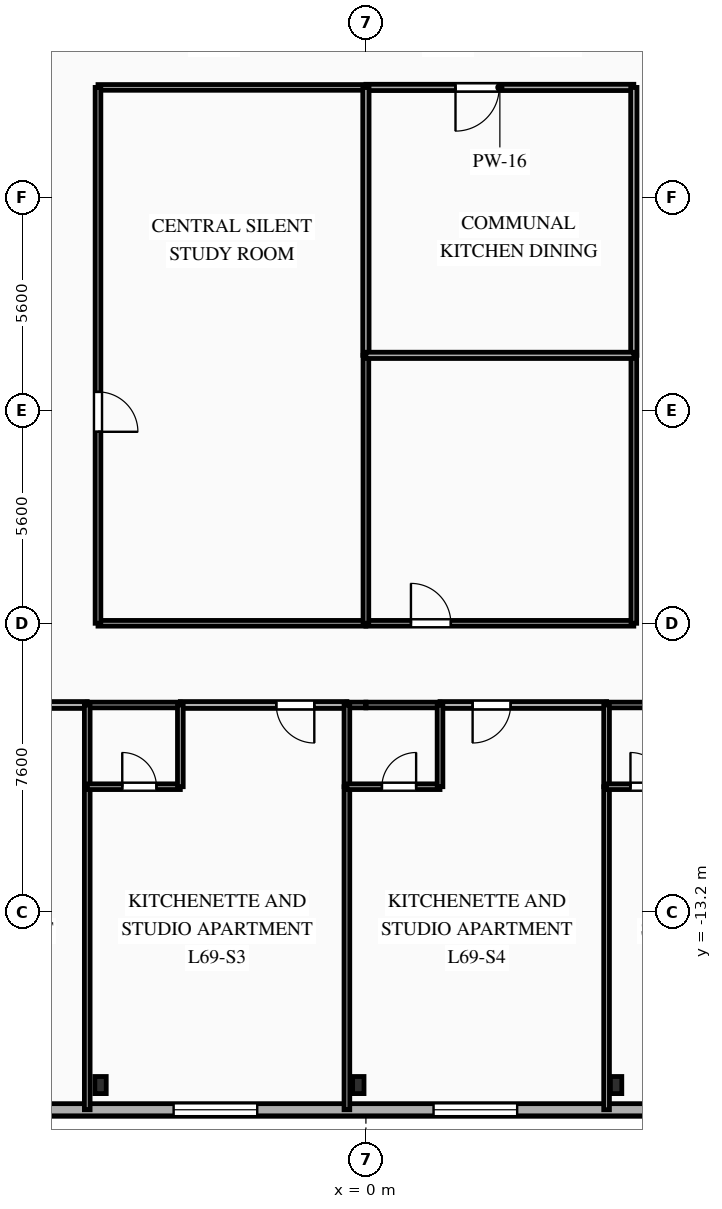
"""IFC4 building model, lengths in metres.
Left out: names, types, materials, properties, quantities, classifications, styles, units other than length and angle.
Written with IfcOpenShell. Run it as: python <this file> out.ifc"""

import sys

from ifc_helpers import new_model, si_unit, direction, frame, frame_2d, origin, origin_2d, place, context, subcontext, project, spatial, rectangle, i_section, extrude, element, fill, save


model = new_model("IFC4")
c1 = context("Model", 3, precision=1e-05, world=origin(), true_north=direction((0.0, 1.0)))
c2 = subcontext(c1, "Body", "Model", "MODEL_VIEW")
j1 = project(units=[si_unit("LENGTHUNIT", "METRE"), si_unit("PLANEANGLEUNIT", "RADIAN")], contexts=[c1])
p1 = place(None, origin())
s1 = spatial("IfcSite", under=j1, at=p1, CompositionType="ELEMENT")
p2 = place(p1, origin())
s2 = spatial("IfcBuilding", under=s1, at=p2, CompositionType="ELEMENT")
p3 = place(p2, frame((0.0, 0.0, 245.05)))
s3 = spatial("IfcBuildingStorey", under=s2, at=p3, CompositionType="ELEMENT", Elevation=245.05)
for number, where, z_axis, x_axis in (
    (1, (-6.983, -17.75, 0.0), (0.0, 0.0, 1.0), (1.0, 0.0, 0.0)),
    (2, (-0.2, -17.75, 0.0), (0.0, 0.0, 1.0), (1.0, 0.0, 0.0)),
    (3, (6.583, -17.75, 0.0), (0.0, 0.0, 1.0), (1.0, 0.0, 0.0)),
):
    element("IfcColumn", number, at=place(p3, frame(where, z_axis=z_axis, x_axis=x_axis)), inside=s3, PredefinedType="COLUMN", context=c2, shape_type="SweptSolid", body=[
        extrude(i_section(OverallWidth=0.3, OverallDepth=0.45, WebThickness=0.014, FlangeThickness=0.026, FilletRadius=0.027, at=origin_2d()), origin(), (0.0, 0.0, 1.0), 3.35),
    ])
p4 = place(p3, frame((20.8, -18.4, 0.0), z_axis=(0.0, 0.0, 1.0), x_axis=(-1.0, 0.0, 0.0)))
e4 = element("IfcWall", 4, at=p4, inside=s3, PredefinedType="SOLIDWALL", context=c2, shape_type="SweptSolid", body=[
    extrude(rectangle(XDim=42.0, YDim=0.32, at=frame_2d((21.0, 0.0))), origin(), (0.0, 0.0, 1.0), 3.04),
])
p5 = place(p4, frame((3.255, 0.0, 0.85)))
e5 = element("IfcOpeningElement", 5, at=p5, cuts=e4, PredefinedType="OPENING", context=c2, shape_type="SweptSolid", body=[
    extrude(rectangle(XDim=1.65, YDim=1.85, at=frame_2d((0.825, 0.925))), frame((0.0, 0.17, 0.0), z_axis=(0.0, -1.0, 0.0), x_axis=(1.0, 0.0, 0.0)), (0.0, 0.0, 1.0), 0.34),
])
p6 = place(p4, frame((9.98, 0.0, 0.85)))
e6 = element("IfcOpeningElement", 6, at=p6, cuts=e4, PredefinedType="OPENING", context=c2, shape_type="SweptSolid", body=[
    extrude(rectangle(XDim=2.2, YDim=1.85, at=frame_2d((1.1, 0.925))), frame((0.0, 0.17, 0.0), z_axis=(0.0, -1.0, 0.0), x_axis=(1.0, 0.0, 0.0)), (0.0, 0.0, 1.0), 0.34),
])
p7 = place(p4, frame((16.82, 0.0, 0.85)))
e7 = element("IfcOpeningElement", 7, at=p7, cuts=e4, PredefinedType="OPENING", context=c2, shape_type="SweptSolid", body=[
    extrude(rectangle(XDim=2.2, YDim=1.85, at=frame_2d((1.1, 0.925))), frame((0.0, 0.17, 0.0), z_axis=(0.0, -1.0, 0.0), x_axis=(1.0, 0.0, 0.0)), (0.0, 0.0, 1.0), 0.34),
])
p8 = place(p4, frame((23.66, 0.0, 0.85)))
e8 = element("IfcOpeningElement", 8, at=p8, cuts=e4, PredefinedType="OPENING", context=c2, shape_type="SweptSolid", body=[
    extrude(rectangle(XDim=2.2, YDim=1.85, at=frame_2d((1.1, 0.925))), frame((0.0, 0.17, 0.0), z_axis=(0.0, -1.0, 0.0), x_axis=(1.0, 0.0, 0.0)), (0.0, 0.0, 1.0), 0.34),
])
p9 = place(p4, frame((30.5, 0.0, 0.85)))
e9 = element("IfcOpeningElement", 9, at=p9, cuts=e4, PredefinedType="OPENING", context=c2, shape_type="SweptSolid", body=[
    extrude(rectangle(XDim=2.2, YDim=1.85, at=frame_2d((1.1, 0.925))), frame((0.0, 0.17, 0.0), z_axis=(0.0, -1.0, 0.0), x_axis=(1.0, 0.0, 0.0)), (0.0, 0.0, 1.0), 0.34),
])
p10 = place(p4, frame((37.375, 0.0, 0.85)))
e10 = element("IfcOpeningElement", 10, at=p10, cuts=e4, PredefinedType="OPENING", context=c2, shape_type="SweptSolid", body=[
    extrude(rectangle(XDim=1.65, YDim=1.85, at=frame_2d((0.825, 0.925))), frame((0.0, 0.17, 0.0), z_axis=(0.0, -1.0, 0.0), x_axis=(1.0, 0.0, 0.0)), (0.0, 0.0, 1.0), 0.34),
])
p11 = place(p3, frame((0.0, 8.5, 0.0), z_axis=(0.0, 0.0, 1.0), x_axis=(-1.0, 0.0, 0.0)))
e11 = element("IfcWall", 11, at=p11, inside=s3, PredefinedType="PARTITIONING", context=c2, shape_type="SweptSolid", body=[
    extrude(rectangle(XDim=7.05, YDim=0.15, at=frame_2d((3.525, 0.0))), origin(), (0.0, 0.0, 1.0), 3.04),
])
p12 = place(p3, frame((7.05, 8.5, 0.0), z_axis=(0.0, 0.0, 1.0), x_axis=(-1.0, 0.0, 0.0)))
e12 = element("IfcWall", 12, at=p12, inside=s3, PredefinedType="PARTITIONING", context=c2, shape_type="SweptSolid", body=[
    extrude(rectangle(XDim=7.05, YDim=0.165, at=frame_2d((3.525, 0.0))), origin(), (0.0, 0.0, 1.0), 3.04),
])
p13 = place(p12, frame((3.542, 0.0, 0.0)))
e13 = element("IfcOpeningElement", 13, at=p13, cuts=e12, PredefinedType="OPENING", context=c2, shape_type="SweptSolid", body=[
    extrude(rectangle(XDim=1.15, YDim=2.15, at=frame_2d((0.575, 1.075))), frame((0.0, 0.093, 0.0), z_axis=(0.0, -1.0, 0.0), x_axis=(1.0, 0.0, 0.0)), (0.0, 0.0, 1.0), 0.185),
])
p14 = place(p3, frame((-7.333, -7.75, 0.0), z_axis=(0.0, 0.0, 1.0), x_axis=(-1.0, 0.0, 0.0)))
e14 = element("IfcWall", 14, at=p14, inside=s3, PredefinedType="PARTITIONING", context=c2, shape_type="SweptSolid", body=[
    extrude(rectangle(XDim=4.384, YDim=0.18, at=frame_2d((2.192, 0.0))), origin(), (0.0, 0.0, 1.0), 3.04),
])
p15 = place(p14, frame((2.526, 0.0, 0.0)))
e15 = element("IfcOpeningElement", 15, at=p15, cuts=e14, PredefinedType="OPENING", context=c2, shape_type="SweptSolid", body=[
    extrude(rectangle(XDim=1.0, YDim=2.15, at=frame_2d((0.5, 1.075))), frame((0.0, 0.1, 0.0), z_axis=(0.0, -1.0, 0.0), x_axis=(1.0, 0.0, 0.0)), (0.0, 0.0, 1.0), 0.2),
])
p16 = place(p3, frame((-0.5, -7.75, 0.0), z_axis=(0.0, 0.0, 1.0), x_axis=(-1.0, 0.0, 0.0)))
e16 = element("IfcWall", 16, at=p16, inside=s3, PredefinedType="PARTITIONING", context=c2, shape_type="SweptSolid", body=[
    extrude(rectangle(XDim=4.383, YDim=0.18, at=frame_2d((2.191, 0.0))), origin(), (0.0, 0.0, 1.0), 3.04),
])
p17 = place(p16, frame((0.858, 0.0, 0.0)))
e17 = element("IfcOpeningElement", 17, at=p17, cuts=e16, PredefinedType="OPENING", context=c2, shape_type="SweptSolid", body=[
    extrude(rectangle(XDim=1.0, YDim=2.15, at=frame_2d((0.5, 1.075))), frame((0.0, 0.1, 0.0), z_axis=(0.0, -1.0, 0.0), x_axis=(1.0, 0.0, 0.0)), (0.0, 0.0, 1.0), 0.2),
])
p18 = place(p3, frame((-4.883, -7.75, 0.0), z_axis=(0.0, 0.0, 1.0), x_axis=(-1.0, 0.0, 0.0)))
e18 = element("IfcWall", 18, at=p18, inside=s3, PredefinedType="PLUMBINGWALL", context=c2, shape_type="SweptSolid", body=[
    extrude(rectangle(XDim=2.45, YDim=0.15, at=frame_2d((1.225, 0.0))), origin(), (0.0, 0.0, 1.0), 3.04),
])
p19 = place(p3, frame((0.0, -7.75, 0.0), z_axis=(0.0, 0.0, 1.0), x_axis=(-1.0, 0.0, 0.0)))
e19 = element("IfcWall", 19, at=p19, inside=s3, PredefinedType="PLUMBINGWALL", context=c2, shape_type="SweptSolid", body=[
    extrude(rectangle(XDim=0.5, YDim=0.15, at=frame_2d((0.25, 0.0))), origin(), (0.0, 0.0, 1.0), 3.04),
])
p20 = place(p3, frame((-7.05, -5.6, 0.0), z_axis=(0.0, 0.0, 1.0), x_axis=(1.0, 0.0, 0.0)))
e20 = element("IfcWall", 20, at=p20, inside=s3, PredefinedType="PARTITIONING", context=c2, shape_type="SweptSolid", body=[
    extrude(rectangle(XDim=7.05, YDim=0.15, at=frame_2d((3.525, 0.0))), origin(), (0.0, 0.0, 1.0), 2.525),
])
p21 = place(p3, frame((6.333, -7.75, 0.0), z_axis=(0.0, 0.0, 1.0), x_axis=(-1.0, 0.0, 0.0)))
e21 = element("IfcWall", 21, at=p21, inside=s3, PredefinedType="PARTITIONING", context=c2, shape_type="SweptSolid", body=[
    extrude(rectangle(XDim=4.383, YDim=0.18, at=frame_2d((2.191, 0.0))), origin(), (0.0, 0.0, 1.0), 3.04),
])
p22 = place(p21, frame((2.525, 0.0, 0.0)))
e22 = element("IfcOpeningElement", 22, at=p22, cuts=e21, PredefinedType="OPENING", context=c2, shape_type="SweptSolid", body=[
    extrude(rectangle(XDim=1.0, YDim=2.15, at=frame_2d((0.5, 1.075))), frame((0.0, 0.1, 0.0), z_axis=(0.0, -1.0, 0.0), x_axis=(1.0, 0.0, 0.0)), (0.0, 0.0, 1.0), 0.2),
])
p23 = place(p3, frame((1.95, -7.75, 0.0), z_axis=(0.0, 0.0, 1.0), x_axis=(-1.0, 0.0, 0.0)))
e23 = element("IfcWall", 23, at=p23, inside=s3, PredefinedType="PLUMBINGWALL", context=c2, shape_type="SweptSolid", body=[
    extrude(rectangle(XDim=1.95, YDim=0.15, at=frame_2d((0.975, 0.0))), origin(), (0.0, 0.0, 1.0), 3.04),
])
p24 = place(p3, frame((8.783, -7.75, 0.0), z_axis=(0.0, 0.0, 1.0), x_axis=(-1.0, 0.0, 0.0)))
e24 = element("IfcWall", 24, at=p24, inside=s3, PredefinedType="PLUMBINGWALL", context=c2, shape_type="SweptSolid", body=[
    extrude(rectangle(XDim=2.45, YDim=0.15, at=frame_2d((1.225, 0.0))), origin(), (0.0, 0.0, 1.0), 3.04),
])
p25 = place(p3, frame((0.0, -5.6, 0.0), z_axis=(0.0, 0.0, 1.0), x_axis=(1.0, 0.0, 0.0)))
e25 = element("IfcWall", 25, at=p25, inside=s3, PredefinedType="PARTITIONING", context=c2, shape_type="SweptSolid", body=[
    extrude(rectangle(XDim=7.05, YDim=0.15, at=frame_2d((3.525, 0.0))), origin(), (0.0, 0.0, 1.0), 2.525),
])
p26 = place(p25, frame((1.185, 0.0, 0.0)))
e26 = element("IfcOpeningElement", 26, at=p26, cuts=e25, PredefinedType="OPENING", context=c2, shape_type="SweptSolid", body=[
    extrude(rectangle(XDim=1.05, YDim=2.15, at=frame_2d((0.525, 1.075))), frame((0.0, 0.085, 0.0), z_axis=(0.0, -1.0, 0.0), x_axis=(1.0, 0.0, 0.0)), (0.0, 0.0, 1.0), 0.17),
])
p27 = place(p3, frame((-7.05, 8.5, 0.0), z_axis=(0.0, 0.0, 1.0), x_axis=(0.0, -1.0, 0.0)))
e27 = element("IfcWall", 27, at=p27, inside=s3, PredefinedType="PARTITIONING", context=c2, shape_type="SweptSolid", body=[
    extrude(rectangle(XDim=14.1, YDim=0.15, at=frame_2d((7.05, 0.0))), origin(), (0.0, 0.0, 1.0), 3.04),
])
p28 = place(p27, frame((8.011, 0.0, 0.0)))
e28 = element("IfcOpeningElement", 28, at=p28, cuts=e27, PredefinedType="OPENING", context=c2, shape_type="SweptSolid", body=[
    extrude(rectangle(XDim=1.05, YDim=2.15, at=frame_2d((0.525, 1.075))), frame((0.0, 0.085, 0.0), z_axis=(0.0, -1.0, 0.0), x_axis=(1.0, 0.0, 0.0)), (0.0, 0.0, 1.0), 0.17),
])
p29 = place(p3, frame((7.05, -5.6, 0.0), z_axis=(0.0, 0.0, 1.0), x_axis=(0.0, 1.0, 0.0)))
e29 = element("IfcWall", 29, at=p29, inside=s3, PredefinedType="PARTITIONING", context=c2, shape_type="SweptSolid", body=[
    extrude(rectangle(XDim=7.05, YDim=0.15, at=frame_2d((3.525, 0.0))), origin(), (0.0, 0.0, 1.0), 3.04),
])
p30 = place(p3, frame((7.05, 1.45, 0.0), z_axis=(0.0, 0.0, 1.0), x_axis=(0.0, 1.0, 0.0)))
e30 = element("IfcWall", 30, at=p30, inside=s3, PredefinedType="PARTITIONING", context=c2, shape_type="SweptSolid", body=[
    extrude(rectangle(XDim=7.05, YDim=0.165, at=frame_2d((3.525, 0.0))), origin(), (0.0, 0.0, 1.0), 3.04),
])
p31 = place(p3, frame((-7.333, -9.9, 0.0), z_axis=(0.0, 0.0, 1.0), x_axis=(0.0, -1.0, 0.0)))
e31 = element("IfcWall", 31, at=p31, inside=s3, PredefinedType="PARTITIONING", context=c2, shape_type="SweptSolid", body=[
    extrude(rectangle(XDim=8.5, YDim=0.15, at=frame_2d((4.25, 0.0))), origin(), (0.0, 0.0, 1.0), 2.665),
])
p32 = place(p3, frame((-7.333, -7.75, 0.0), z_axis=(0.0, 0.0, 1.0), x_axis=(0.0, -1.0, 0.0)))
e32 = element("IfcWall", 32, at=p32, inside=s3, PredefinedType="PLUMBINGWALL", context=c2, shape_type="SweptSolid", body=[
    extrude(rectangle(XDim=2.15, YDim=0.15, at=frame_2d((1.075, 0.0))), origin(), (0.0, 0.0, 1.0), 3.04),
])
p33 = place(p3, frame((-7.333, -9.9, 0.0), z_axis=(0.0, 0.0, 1.0), x_axis=(1.0, 0.0, 0.0)))
e33 = element("IfcWall", 33, at=p33, inside=s3, PredefinedType="PLUMBINGWALL", context=c2, shape_type="SweptSolid", body=[
    extrude(rectangle(XDim=2.45, YDim=0.15, at=frame_2d((1.225, 0.0))), origin(), (0.0, 0.0, 1.0), 3.04),
])
p34 = place(p33, frame((0.921, 0.0, 0.0)))
e34 = element("IfcOpeningElement", 34, at=p34, cuts=e33, PredefinedType="OPENING", context=c2, shape_type="SweptSolid", body=[
    extrude(rectangle(XDim=0.9, YDim=2.1, at=frame_2d((0.45, 1.05))), frame((0.0, 0.085, 0.0), z_axis=(0.0, -1.0, 0.0), x_axis=(1.0, 0.0, 0.0)), (0.0, 0.0, 1.0), 0.17),
])
p35 = place(p3, frame((-4.883, -9.9, 0.0), z_axis=(0.0, 0.0, 1.0), x_axis=(0.0, 1.0, 0.0)))
e35 = element("IfcWall", 35, at=p35, inside=s3, PredefinedType="PLUMBINGWALL", context=c2, shape_type="SweptSolid", body=[
    extrude(rectangle(XDim=2.15, YDim=0.15, at=frame_2d((1.075, 0.0))), origin(), (0.0, 0.0, 1.0), 3.04),
])
p36 = place(p3, frame((-0.5, -9.9, 0.0), z_axis=(0.0, 0.0, 1.0), x_axis=(0.0, -1.0, 0.0)))
e36 = element("IfcWall", 36, at=p36, inside=s3, PredefinedType="PARTITIONING", context=c2, shape_type="SweptSolid", body=[
    extrude(rectangle(XDim=8.5, YDim=0.15, at=frame_2d((4.25, 0.0))), origin(), (0.0, 0.0, 1.0), 3.04),
])
p37 = place(p3, frame((-0.5, -7.75, 0.0), z_axis=(0.0, 0.0, 1.0), x_axis=(0.0, -1.0, 0.0)))
e37 = element("IfcWall", 37, at=p37, inside=s3, PredefinedType="PLUMBINGWALL", context=c2, shape_type="SweptSolid", body=[
    extrude(rectangle(XDim=2.15, YDim=0.15, at=frame_2d((1.075, 0.0))), origin(), (0.0, 0.0, 1.0), 3.04),
])
p38 = place(p3, frame((-0.5, -9.9, 0.0), z_axis=(0.0, 0.0, 1.0), x_axis=(1.0, 0.0, 0.0)))
e38 = element("IfcWall", 38, at=p38, inside=s3, PredefinedType="PLUMBINGWALL", context=c2, shape_type="SweptSolid", body=[
    extrude(rectangle(XDim=2.45, YDim=0.15, at=frame_2d((1.225, 0.0))), origin(), (0.0, 0.0, 1.0), 3.04),
])
p39 = place(p38, frame((0.921, 0.0, 0.0)))
e39 = element("IfcOpeningElement", 39, at=p39, cuts=e38, PredefinedType="OPENING", context=c2, shape_type="SweptSolid", body=[
    extrude(rectangle(XDim=0.9, YDim=2.1, at=frame_2d((0.45, 1.05))), frame((0.0, 0.085, 0.0), z_axis=(0.0, -1.0, 0.0), x_axis=(1.0, 0.0, 0.0)), (0.0, 0.0, 1.0), 0.17),
])
p40 = place(p3, frame((1.95, -9.9, 0.0), z_axis=(0.0, 0.0, 1.0), x_axis=(0.0, 1.0, 0.0)))
e40 = element("IfcWall", 40, at=p40, inside=s3, PredefinedType="PLUMBINGWALL", context=c2, shape_type="SweptSolid", body=[
    extrude(rectangle(XDim=2.15, YDim=0.15, at=frame_2d((1.075, 0.0))), origin(), (0.0, 0.0, 1.0), 3.04),
])
p41 = place(p3, frame((6.333, -9.9, 0.0), z_axis=(0.0, 0.0, 1.0), x_axis=(0.0, -1.0, 0.0)))
e41 = element("IfcWall", 41, at=p41, inside=s3, PredefinedType="PARTITIONING", context=c2, shape_type="SweptSolid", body=[
    extrude(rectangle(XDim=8.5, YDim=0.15, at=frame_2d((4.25, 0.0))), origin(), (0.0, 0.0, 1.0), 3.04),
])
p42 = place(p3, frame((6.333, -7.75, 0.0), z_axis=(0.0, 0.0, 1.0), x_axis=(0.0, -1.0, 0.0)))
e42 = element("IfcWall", 42, at=p42, inside=s3, PredefinedType="PLUMBINGWALL", context=c2, shape_type="SweptSolid", body=[
    extrude(rectangle(XDim=2.15, YDim=0.15, at=frame_2d((1.075, 0.0))), origin(), (0.0, 0.0, 1.0), 3.04),
])
p43 = place(p3, frame((6.333, -9.9, 0.0), z_axis=(0.0, 0.0, 1.0), x_axis=(1.0, 0.0, 0.0)))
e43 = element("IfcWall", 43, at=p43, inside=s3, PredefinedType="PLUMBINGWALL", context=c2, shape_type="SweptSolid", body=[
    extrude(rectangle(XDim=2.45, YDim=0.15, at=frame_2d((1.225, 0.0))), origin(), (0.0, 0.0, 1.0), 3.04),
])
p44 = place(p43, frame((0.629, 0.0, 0.0)))
e44 = element("IfcOpeningElement", 44, at=p44, cuts=e43, PredefinedType="OPENING", context=c2, shape_type="SweptSolid", body=[
    extrude(rectangle(XDim=0.9, YDim=2.1, at=frame_2d((0.45, 1.05))), frame((0.0, 0.085, 0.0), z_axis=(0.0, -1.0, 0.0), x_axis=(1.0, 0.0, 0.0)), (0.0, 0.0, 1.0), 0.17),
])
p45 = place(p3, frame((0.0, 1.45, 0.0), z_axis=(0.0, 0.0, 1.0), x_axis=(0.0, -1.0, 0.0)))
e45 = element("IfcWall", 45, at=p45, inside=s3, PredefinedType="PARTITIONING", context=c2, shape_type="SweptSolid", body=[
    extrude(rectangle(XDim=7.05, YDim=0.15, at=frame_2d((3.525, 0.0))), origin(), (0.0, 0.0, 1.0), 3.04),
])
for number, where, z_axis, x_axis in (
    (46, (0.0, 8.5, 0.0), (0.0, 0.0, 1.0), (0.0, -1.0, 0.0)),
    (47, (0.0, 1.45, 0.0), (0.0, 0.0, 1.0), (1.0, 0.0, 0.0)),
):
    element("IfcWall", number, at=place(p3, frame(where, z_axis=z_axis, x_axis=x_axis)), inside=s3, PredefinedType="PARTITIONING", context=c2, shape_type="SweptSolid", body=[
        extrude(rectangle(XDim=7.05, YDim=0.165, at=frame_2d((3.525, 0.0))), origin(), (0.0, 0.0, 1.0), 3.04),
    ])
p46 = place(p7, origin())
e48 = element("IfcWindow", 48, at=p46, inside=s3, PartitioningType="SINGLE_PANEL", PredefinedType="WINDOW", context=c2, shape_type="SweptSolid", body=[
    extrude(rectangle(XDim=2.2, YDim=1.85, at=frame_2d((1.1, 0.925))), frame((0.0, 0.03, 0.0), z_axis=(0.0, -1.0, 0.0), x_axis=(1.0, 0.0, 0.0)), (0.0, 0.0, 1.0), 0.06),
])
fill(e7, e48)
p47 = place(p8, origin())
e49 = element("IfcWindow", 49, at=p47, inside=s3, PartitioningType="SINGLE_PANEL", PredefinedType="WINDOW", context=c2, shape_type="SweptSolid", body=[
    extrude(rectangle(XDim=2.2, YDim=1.85, at=frame_2d((1.1, 0.925))), frame((0.0, 0.03, 0.0), z_axis=(0.0, -1.0, 0.0), x_axis=(1.0, 0.0, 0.0)), (0.0, 0.0, 1.0), 0.06),
])
fill(e8, e49)
p48 = place(p13, origin())
e50 = element("IfcDoor", 50, at=p48, inside=s3, OperationType="SINGLE_SWING_RIGHT", PredefinedType="DOOR", context=c2, shape_type="SweptSolid", body=[
    extrude(rectangle(XDim=1.15, YDim=2.15, at=frame_2d((0.575, 1.075))), frame((0.0, 0.025, 0.0), z_axis=(0.0, -1.0, 0.0), x_axis=(1.0, 0.0, 0.0)), (0.0, 0.0, 1.0), 0.05),
])
fill(e13, e50)
p49 = place(p17, origin())
e51 = element("IfcDoor", 51, at=p49, inside=s3, OperationType="SINGLE_SWING_LEFT", PredefinedType="DOOR", context=c2, shape_type="SweptSolid", body=[
    extrude(rectangle(XDim=1.0, YDim=2.15, at=frame_2d((0.5, 1.075))), frame((0.0, 0.025, 0.0), z_axis=(0.0, -1.0, 0.0), x_axis=(1.0, 0.0, 0.0)), (0.0, 0.0, 1.0), 0.05),
])
fill(e17, e51)
p50 = place(p22, origin())
e52 = element("IfcDoor", 52, at=p50, inside=s3, OperationType="SINGLE_SWING_RIGHT", PredefinedType="DOOR", context=c2, shape_type="SweptSolid", body=[
    extrude(rectangle(XDim=1.0, YDim=2.15, at=frame_2d((0.5, 1.075))), frame((0.0, 0.025, 0.0), z_axis=(0.0, -1.0, 0.0), x_axis=(1.0, 0.0, 0.0)), (0.0, 0.0, 1.0), 0.05),
])
fill(e22, e52)
p51 = place(p26, origin())
e53 = element("IfcDoor", 53, at=p51, inside=s3, OperationType="SINGLE_SWING_LEFT", PredefinedType="DOOR", context=c2, shape_type="SweptSolid", body=[
    extrude(rectangle(XDim=1.05, YDim=2.15, at=frame_2d((0.525, 1.075))), frame((0.0, 0.025, 0.0), z_axis=(0.0, -1.0, 0.0), x_axis=(1.0, 0.0, 0.0)), (0.0, 0.0, 1.0), 0.05),
])
fill(e26, e53)
p52 = place(p28, origin())
e54 = element("IfcDoor", 54, at=p52, inside=s3, OperationType="SINGLE_SWING_RIGHT", PredefinedType="DOOR", context=c2, shape_type="SweptSolid", body=[
    extrude(rectangle(XDim=1.05, YDim=2.15, at=frame_2d((0.525, 1.075))), frame((0.0, 0.025, 0.0), z_axis=(0.0, -1.0, 0.0), x_axis=(1.0, 0.0, 0.0)), (0.0, 0.0, 1.0), 0.05),
])
fill(e28, e54)
p53 = place(p34, origin())
e55 = element("IfcDoor", 55, at=p53, inside=s3, OperationType="SINGLE_SWING_LEFT", PredefinedType="DOOR", context=c2, shape_type="SweptSolid", body=[
    extrude(rectangle(XDim=0.9, YDim=2.1, at=frame_2d((0.45, 1.05))), frame((0.0, 0.025, 0.0), z_axis=(0.0, -1.0, 0.0), x_axis=(1.0, 0.0, 0.0)), (0.0, 0.0, 1.0), 0.05),
])
fill(e34, e55)
p54 = place(p39, origin())
e56 = element("IfcDoor", 56, at=p54, inside=s3, OperationType="SINGLE_SWING_RIGHT", PredefinedType="DOOR", context=c2, shape_type="SweptSolid", body=[
    extrude(rectangle(XDim=0.9, YDim=2.1, at=frame_2d((0.45, 1.05))), frame((0.0, 0.025, 0.0), z_axis=(0.0, -1.0, 0.0), x_axis=(1.0, 0.0, 0.0)), (0.0, 0.0, 1.0), 0.05),
])
fill(e39, e56)
p55 = place(p44, origin())
e57 = element("IfcDoor", 57, at=p55, inside=s3, OperationType="SINGLE_SWING_LEFT", PredefinedType="DOOR", context=c2, shape_type="SweptSolid", body=[
    extrude(rectangle(XDim=0.9, YDim=2.1, at=frame_2d((0.45, 1.05))), frame((0.0, 0.025, 0.0), z_axis=(0.0, -1.0, 0.0), x_axis=(1.0, 0.0, 0.0)), (0.0, 0.0, 1.0), 0.05),
])
fill(e44, e57)
save(model, sys.argv[1])
